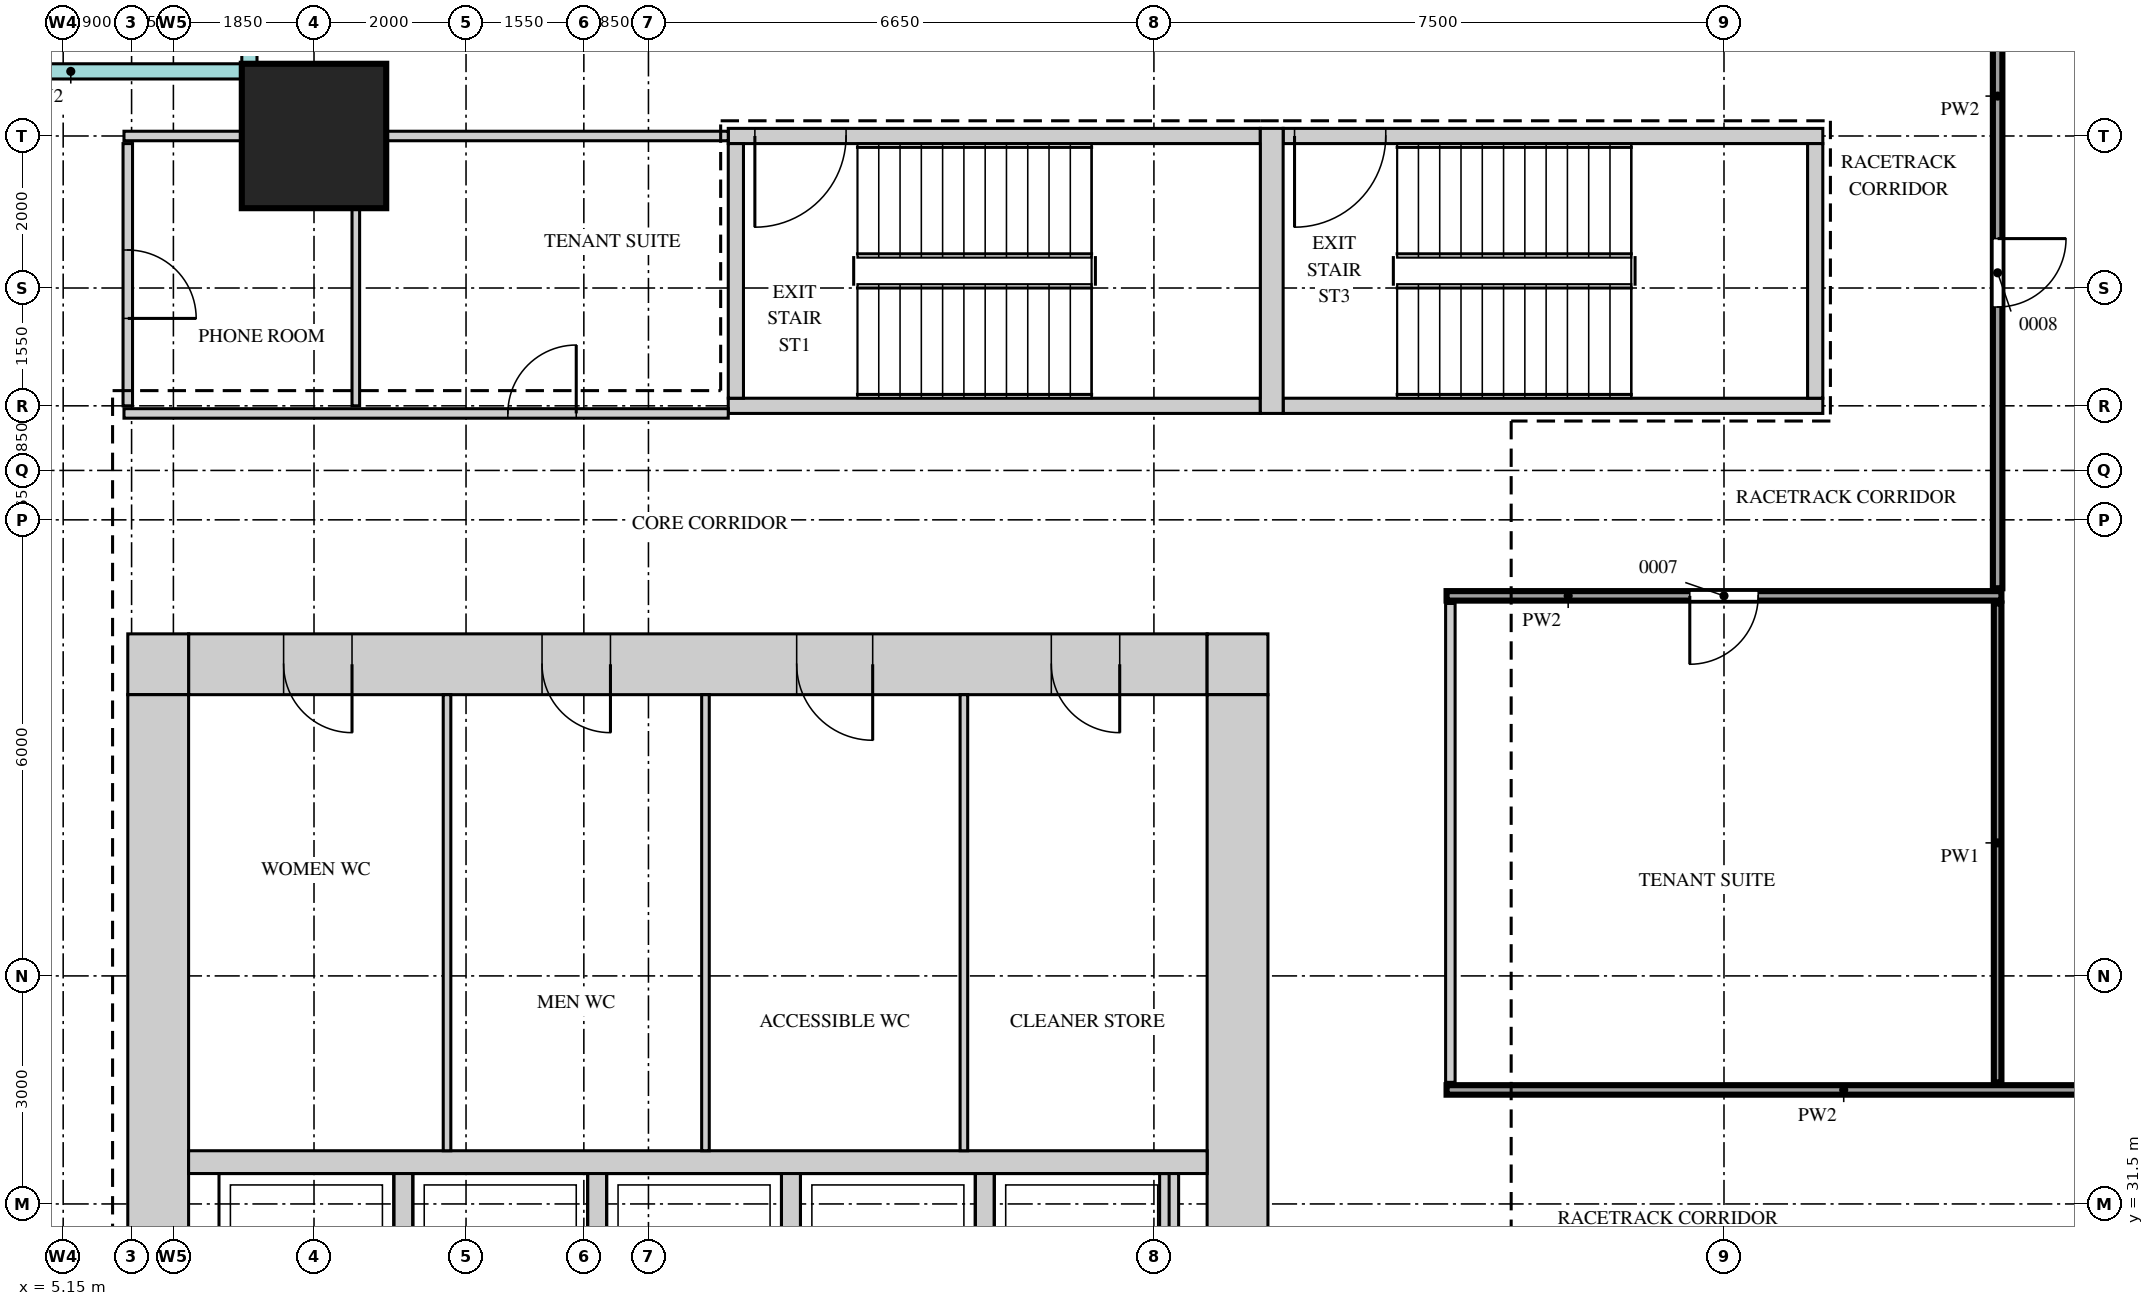
"""IFC4 building model, lengths in metres.
Left out: names, types, materials, properties, quantities, classifications, styles, units other than length and angle.
Written with IfcOpenShell. Run it as: python <this file> out.ifc"""

import sys

from ifc_helpers import new_model, si_unit, direction, frame, frame_2d, origin, origin_2d, place, context, subcontext, project, spatial, rectangle, extrude, source, transform, mapped, element, fill, save


model = new_model("IFC4")
c1 = context("Model", 3, precision=1e-05, world=origin(), true_north=direction((0.0, 1.0)))
c2 = subcontext(c1, "Body", "Model", "MODEL_VIEW")
j1 = project(units=[si_unit("LENGTHUNIT", "METRE"), si_unit("PLANEANGLEUNIT", "RADIAN")], contexts=[c1])
p1 = place(None, origin())
s1 = spatial("IfcSite", under=j1, at=p1, CompositionType="ELEMENT")
p2 = place(p1, origin())
s2 = spatial("IfcBuilding", under=s1, at=p2, CompositionType="ELEMENT")
p3 = place(p2, frame((0.0, 0.0, 184.7)))
s3 = spatial("IfcBuildingStorey", under=s2, at=p3, CompositionType="ELEMENT", Elevation=184.7)
m1 = source(origin(), c2, "Body", "SweptSolid", [
    extrude(rectangle(XDim=13.4, YDim=0.8, at=frame_2d((6.7, 0.0))), origin(), (0.0, 0.0, 1.0), 3.75),
])
p4 = place(p3, frame((6.8, 38.6, 0.0), z_axis=(0.0, 0.0, 1.0), x_axis=(1.0, 0.0, 0.0)))
e1 = element("IfcWall", 1, at=p4, inside=s3, PredefinedType="SHEAR", context=c2, shape_type="MappedRepresentation", body=[
    mapped(m1, transform((0.0, 0.0, 0.0))),
])
m2 = source(origin(), c2, "Body", "SweptSolid", [
    extrude(rectangle(XDim=0.9, YDim=2.1, at=frame_2d((0.45, 1.05))), frame((0.0, 0.41, 0.0), z_axis=(0.0, -1.0, 0.0), x_axis=(1.0, 0.0, 0.0)), (0.0, 0.0, 1.0), 0.82),
])
p5 = place(p4, frame((1.25, 0.0, 0.0)))
e2 = element("IfcOpeningElement", 2, at=p5, cuts=e1, PredefinedType="OPENING", context=c2, shape_type="MappedRepresentation", body=[
    mapped(m2, transform((0.0, 0.0, 0.0))),
])
p6 = place(p4, frame((4.65, 0.0, 0.0)))
e3 = element("IfcOpeningElement", 3, at=p6, cuts=e1, PredefinedType="OPENING", context=c2, shape_type="MappedRepresentation", body=[
    mapped(m2, transform((0.0, 0.0, 0.0))),
])
m3 = source(origin(), c2, "Body", "SweptSolid", [
    extrude(rectangle(XDim=1.0, YDim=2.1, at=frame_2d((0.5, 1.05))), frame((0.0, 0.41, 0.0), z_axis=(0.0, -1.0, 0.0), x_axis=(1.0, 0.0, 0.0)), (0.0, 0.0, 1.0), 0.82),
])
p7 = place(p4, frame((8.0, 0.0, 0.0)))
e4 = element("IfcOpeningElement", 4, at=p7, cuts=e1, PredefinedType="OPENING", context=c2, shape_type="MappedRepresentation", body=[
    mapped(m3, transform((0.0, 0.0, 0.0))),
])
p8 = place(p4, frame((11.35, 0.0, 0.0)))
e5 = element("IfcOpeningElement", 5, at=p8, cuts=e1, PredefinedType="OPENING", context=c2, shape_type="MappedRepresentation", body=[
    mapped(m2, transform((0.0, 0.0, 0.0))),
])
m4 = source(origin(), c2, "Body", "SweptSolid", [
    extrude(rectangle(XDim=0.8, YDim=0.8, at=frame_2d((0.4, 0.0))), origin(), (0.0, 0.0, 1.0), 3.75),
])
for number, where, z_axis, x_axis in (
    (6, (20.2, 38.6, 0.0), (0.0, 0.0, 1.0), (1.0, 0.0, 0.0)),
    (7, (6.0, 38.6, 0.0), (0.0, 0.0, 1.0), (1.0, 0.0, 0.0)),
):
    element("IfcWall", number, at=place(p3, frame(where, z_axis=z_axis, x_axis=x_axis)), inside=s3, PredefinedType="SHEAR", context=c2, shape_type="MappedRepresentation", body=[
        mapped(m4, transform((0.0, 0.0, 0.0))),
    ])
m5 = source(origin(), c2, "Body", "SweptSolid", [
    extrude(rectangle(XDim=22.4, YDim=0.8, at=frame_2d((11.2, 0.0))), origin(), (0.0, 0.0, 1.0), 3.75),
])
p9 = place(p3, frame((20.6, 15.8, 0.0), z_axis=(0.0, 0.0, 1.0), x_axis=(0.0, 1.0, 0.0)))
e8 = element("IfcWall", 8, at=p9, inside=s3, PredefinedType="SHEAR", context=c2, shape_type="MappedRepresentation", body=[
    mapped(m5, transform((0.0, 0.0, 0.0))),
])
m6 = source(origin(), c2, "Body", "SweptSolid", [
    extrude(rectangle(XDim=1.8, YDim=2.1, at=frame_2d((0.9, 1.05))), frame((0.0, 0.41, 0.0), z_axis=(0.0, -1.0, 0.0), x_axis=(1.0, 0.0, 0.0)), (0.0, 0.0, 1.0), 0.82),
])
p10 = place(p9, frame((10.7, 0.0, 0.0)))
e9 = element("IfcOpeningElement", 9, at=p10, cuts=e8, PredefinedType="OPENING", context=c2, shape_type="MappedRepresentation", body=[
    mapped(m6, transform((0.0, 0.0, 0.0))),
])
p11 = place(p9, frame((0.35, 0.0, 0.0)))
e10 = element("IfcOpeningElement", 10, at=p11, cuts=e8, PredefinedType="OPENING", context=c2, shape_type="MappedRepresentation", body=[
    mapped(m2, transform((0.0, 0.0, 0.0))),
])
p12 = place(p9, frame((3.9, 0.0, 0.0)))
e11 = element("IfcOpeningElement", 11, at=p12, cuts=e8, PredefinedType="OPENING", context=c2, shape_type="MappedRepresentation", body=[
    mapped(m2, transform((0.0, 0.0, 0.0))),
])
p13 = place(p3, frame((6.4, 15.8, 0.0), z_axis=(0.0, 0.0, 1.0), x_axis=(0.0, 1.0, 0.0)))
e12 = element("IfcWall", 12, at=p13, inside=s3, PredefinedType="SHEAR", context=c2, shape_type="MappedRepresentation", body=[
    mapped(m5, transform((0.0, 0.0, 0.0))),
])
m7 = source(origin(), c2, "Body", "SweptSolid", [
    extrude(rectangle(XDim=7.0, YDim=0.2, at=frame_2d((3.5, 0.0))), origin(), (0.0, 0.0, 1.0), 3.75),
])
p14 = place(p3, frame((13.9, 45.55, 0.0), z_axis=(0.0, 0.0, 1.0), x_axis=(1.0, 0.0, 0.0)))
e13 = element("IfcWall", 13, at=p14, inside=s3, PredefinedType="SHEAR", context=c2, shape_type="MappedRepresentation", body=[
    mapped(m7, transform((0.0, 0.0, 0.0))),
])
m8 = source(origin(), c2, "Body", "SweptSolid", [
    extrude(rectangle(XDim=1.2, YDim=2.1, at=frame_2d((0.6, 1.05))), frame((0.0, 0.11, 0.0), z_axis=(0.0, -1.0, 0.0), x_axis=(1.0, 0.0, 0.0)), (0.0, 0.0, 1.0), 0.22),
])
p15 = place(p14, frame((0.35, 0.0, 0.0)))
e14 = element("IfcOpeningElement", 14, at=p15, cuts=e13, PredefinedType="OPENING", context=c2, shape_type="MappedRepresentation", body=[
    mapped(m8, transform((0.0, 0.0, 0.0))),
])
p16 = place(p3, frame((13.9, 42.0, 0.0), z_axis=(0.0, 0.0, 1.0), x_axis=(1.0, 0.0, 0.0)))
e15 = element("IfcWall", 15, at=p16, inside=s3, PredefinedType="SHEAR", context=c2, shape_type="MappedRepresentation", body=[
    mapped(m7, transform((0.0, 0.0, 0.0))),
])
m9 = source(origin(), c2, "Body", "SweptSolid", [
    extrude(rectangle(XDim=7.1, YDim=0.2, at=frame_2d((3.55, 0.0))), origin(), (0.0, 0.0, 1.0), 3.75),
])
p17 = place(p3, frame((21.2, 45.55, 0.0), z_axis=(0.0, 0.0, 1.0), x_axis=(1.0, 0.0, 0.0)))
e16 = element("IfcWall", 16, at=p17, inside=s3, PredefinedType="SHEAR", context=c2, shape_type="MappedRepresentation", body=[
    mapped(m9, transform((0.0, 0.0, 0.0))),
])
p18 = place(p17, frame((0.15, 0.0, 0.0)))
e17 = element("IfcOpeningElement", 17, at=p18, cuts=e16, PredefinedType="OPENING", context=c2, shape_type="MappedRepresentation", body=[
    mapped(m8, transform((0.0, 0.0, 0.0))),
])
p19 = place(p3, frame((21.2, 42.0, 0.0), z_axis=(0.0, 0.0, 1.0), x_axis=(1.0, 0.0, 0.0)))
e18 = element("IfcWall", 18, at=p19, inside=s3, PredefinedType="SHEAR", context=c2, shape_type="MappedRepresentation", body=[
    mapped(m9, transform((0.0, 0.0, 0.0))),
])
m10 = source(origin(), c2, "Body", "SweptSolid", [
    extrude(rectangle(XDim=3.75, YDim=0.3, at=frame_2d((1.875, 0.0))), origin(), (0.0, 0.0, 1.0), 3.75),
])
p20 = place(p3, frame((21.05, 41.9, 0.0), z_axis=(0.0, 0.0, 1.0), x_axis=(0.0, 1.0, 0.0)))
e19 = element("IfcWall", 19, at=p20, inside=s3, PredefinedType="SHEAR", context=c2, shape_type="MappedRepresentation", body=[
    mapped(m10, transform((0.0, 0.0, 0.0))),
])
m11 = source(origin(), c2, "Body", "SweptSolid", [
    extrude(rectangle(XDim=3.35, YDim=0.2, at=frame_2d((1.675, 0.0))), origin(), (0.0, 0.0, 1.0), 3.75),
])
for number, where, z_axis, x_axis in (
    (20, (14.0, 42.1, 0.0), (0.0, 0.0, 1.0), (0.0, 1.0, 0.0)),
    (21, (28.2, 42.1, 0.0), (0.0, 0.0, 1.0), (0.0, 1.0, 0.0)),
):
    element("IfcWall", number, at=place(p3, frame(where, z_axis=z_axis, x_axis=x_axis)), inside=s3, PredefinedType="SHEAR", context=c2, shape_type="MappedRepresentation", body=[
        mapped(m11, transform((0.0, 0.0, 0.0))),
    ])
m12 = source(origin(), c2, "Body", "SweptSolid", [
    extrude(rectangle(XDim=13.4, YDim=0.3, at=frame_2d((6.7, 0.0))), origin(), (0.0, 0.0, 1.0), 3.75),
])
p21 = place(p3, frame((6.8, 32.05, 0.0), z_axis=(0.0, 0.0, 1.0), x_axis=(1.0, 0.0, 0.0)))
e22 = element("IfcWall", 22, at=p21, inside=s3, PredefinedType="STANDARD", context=c2, shape_type="MappedRepresentation", body=[
    mapped(m12, transform((0.0, 0.0, 0.0))),
])
m13 = source(origin(), c2, "Body", "SweptSolid", [
    extrude(rectangle(XDim=2.4, YDim=0.25, at=frame_2d((1.2, 0.0))), origin(), (0.0, 0.0, 1.0), 3.75),
])
for number, where, z_axis, x_axis in (
    (23, (17.275, 29.5, 0.0), (0.0, 0.0, 1.0), (0.0, 1.0, 0.0)),
    (24, (19.7, 29.5, 0.0), (0.0, 0.0, 1.0), (0.0, 1.0, 0.0)),
    (25, (9.625, 29.5, 0.0), (0.0, 0.0, 1.0), (0.0, 1.0, 0.0)),
    (26, (12.175, 29.5, 0.0), (0.0, 0.0, 1.0), (0.0, 1.0, 0.0)),
    (27, (14.725, 29.5, 0.0), (0.0, 0.0, 1.0), (0.0, 1.0, 0.0)),
):
    element("IfcWall", number, at=place(p3, frame(where, z_axis=z_axis, x_axis=x_axis)), inside=s3, PredefinedType="STANDARD", context=c2, shape_type="MappedRepresentation", body=[
        mapped(m13, transform((0.0, 0.0, 0.0))),
    ])
m14 = source(origin(), c2, "Body", "SweptSolid", [
    extrude(rectangle(XDim=1.9, YDim=1.9, at=origin_2d()), origin(), (0.0, 0.0, 1.0), 4.0),
])
p22 = place(p3, frame((8.45, 45.55, 0.0), z_axis=(0.0, 0.0, 1.0), x_axis=(1.0, 0.0, 0.0)))
e28 = element("IfcColumn", 28, at=p22, inside=s3, PredefinedType="COLUMN", context=c2, shape_type="MappedRepresentation", body=[
    mapped(m14, transform((0.0, 0.0, 0.0))),
])
m15 = source(origin(), c2, "Body", "SweptSolid", [
    extrude(rectangle(XDim=6.0, YDim=0.1, at=frame_2d((3.0, 0.0))), origin(), (0.0, 0.0, 1.0), 3.8),
])
for number, where, z_axis, x_axis in (
    (29, (10.2, 32.2, 0.0), (0.0, 0.0, 1.0), (0.0, 1.0, 0.0)),
    (30, (13.6, 32.2, 0.0), (0.0, 0.0, 1.0), (0.0, 1.0, 0.0)),
    (31, (17.0, 32.2, 0.0), (0.0, 0.0, 1.0), (0.0, 1.0, 0.0)),
):
    element("IfcWall", number, at=place(p3, frame(where, z_axis=z_axis, x_axis=x_axis)), inside=s3, PredefinedType="PARTITIONING", context=c2, shape_type="MappedRepresentation", body=[
        mapped(m15, transform((0.0, 0.0, 0.0))),
    ])
m16 = source(origin(), c2, "Body", "SweptSolid", [
    extrude(rectangle(XDim=10.45, YDim=0.125, at=frame_2d((5.225, 0.0))), origin(), (0.0, 0.0, 1.0), 3.8),
])
p23 = place(p3, frame((23.35, 33.0, 0.0), z_axis=(0.0, 0.0, 1.0), x_axis=(1.0, 0.0, 0.0)))
e32 = element("IfcWall", 32, at=p23, inside=s3, PredefinedType="PARTITIONING", context=c2, shape_type="MappedRepresentation", body=[
    mapped(m16, transform((0.0, 0.0, 0.0))),
])
m17 = source(origin(), c2, "Body", "SweptSolid", [
    extrude(rectangle(XDim=6.3, YDim=0.125, at=frame_2d((3.15, 0.0))), origin(), (0.0, 0.0, 1.0), 3.8),
])
p24 = place(p3, frame((23.4, 33.1, 0.0), z_axis=(0.0, 0.0, 1.0), x_axis=(0.0, 1.0, 0.0)))
e33 = element("IfcWall", 33, at=p24, inside=s3, PredefinedType="PARTITIONING", context=c2, shape_type="MappedRepresentation", body=[
    mapped(m17, transform((0.0, 0.0, 0.0))),
])
m18 = source(origin(), c2, "Body", "SweptSolid", [
    extrude(rectangle(XDim=6.3, YDim=0.1, at=frame_2d((3.15, 0.0))), origin(), (0.0, 0.0, 1.0), 3.8),
])
p25 = place(p3, frame((30.6, 33.1, 0.0), z_axis=(0.0, 0.0, 1.0), x_axis=(0.0, 1.0, 0.0)))
e34 = element("IfcWall", 34, at=p25, inside=s3, PredefinedType="PARTITIONING", context=c2, shape_type="MappedRepresentation", body=[
    mapped(m18, transform((0.0, 0.0, 0.0))),
])
m19 = source(origin(), c2, "Body", "SweptSolid", [
    extrude(rectangle(XDim=7.3, YDim=0.125, at=frame_2d((3.65, 0.0))), origin(), (0.0, 0.0, 1.0), 3.8),
])
p26 = place(p3, frame((23.35, 39.5, 0.0), z_axis=(0.0, 0.0, 1.0), x_axis=(1.0, 0.0, 0.0)))
e35 = element("IfcWall", 35, at=p26, inside=s3, PredefinedType="PARTITIONING", context=c2, shape_type="MappedRepresentation", body=[
    mapped(m19, transform((0.0, 0.0, 0.0))),
])
m20 = source(origin(), c2, "Body", "SweptSolid", [
    extrude(rectangle(XDim=0.9, YDim=2.1, at=frame_2d((0.45, 1.05))), frame((0.0, 0.073, 0.0), z_axis=(0.0, -1.0, 0.0), x_axis=(1.0, 0.0, 0.0)), (0.0, 0.0, 1.0), 0.145),
])
p27 = place(p26, frame((3.2, 0.0, 0.0)))
e36 = element("IfcOpeningElement", 36, at=p27, cuts=e35, PredefinedType="OPENING", context=c2, shape_type="MappedRepresentation", body=[
    mapped(m20, transform((0.0, 0.0, 0.0))),
])
m21 = source(origin(), c2, "Body", "SweptSolid", [
    extrude(rectangle(XDim=8.35, YDim=0.125, at=frame_2d((4.175, 0.0))), origin(), (0.0, 0.0, 1.0), 3.8),
])
p28 = place(p3, frame((30.6, 39.6, 0.0), z_axis=(0.0, 0.0, 1.0), x_axis=(0.0, 1.0, 0.0)))
e37 = element("IfcWall", 37, at=p28, inside=s3, PredefinedType="PARTITIONING", context=c2, shape_type="MappedRepresentation", body=[
    mapped(m21, transform((0.0, 0.0, 0.0))),
])
p29 = place(p28, frame((3.7, 0.0, 0.0)))
e38 = element("IfcOpeningElement", 38, at=p29, cuts=e37, PredefinedType="OPENING", context=c2, shape_type="MappedRepresentation", body=[
    mapped(m20, transform((0.0, 0.0, 0.0))),
])
m22 = source(origin(), c2, "Body", "SweptSolid", [
    extrude(rectangle(XDim=7.95, YDim=0.125, at=frame_2d((3.975, 0.0))), origin(), (0.0, 0.0, 1.0), 3.8),
])
p30 = place(p3, frame((5.95, 41.9, 0.0), z_axis=(0.0, 0.0, 1.0), x_axis=(1.0, 0.0, 0.0)))
e39 = element("IfcWall", 39, at=p30, inside=s3, PredefinedType="PARTITIONING", context=c2, shape_type="MappedRepresentation", body=[
    mapped(m22, transform((0.0, 0.0, 0.0))),
])
p31 = place(p30, frame((5.05, 0.0, 0.0)))
e40 = element("IfcOpeningElement", 40, at=p31, cuts=e39, PredefinedType="OPENING", context=c2, shape_type="MappedRepresentation", body=[
    mapped(m20, transform((0.0, 0.0, 0.0))),
])
m23 = source(origin(), c2, "Body", "SweptSolid", [
    extrude(rectangle(XDim=3.45, YDim=0.125, at=frame_2d((1.725, 0.0))), origin(), (0.0, 0.0, 1.0), 3.8),
])
p32 = place(p3, frame((6.0, 42.0, 0.0), z_axis=(0.0, 0.0, 1.0), x_axis=(0.0, 1.0, 0.0)))
e41 = element("IfcWall", 41, at=p32, inside=s3, PredefinedType="PARTITIONING", context=c2, shape_type="MappedRepresentation", body=[
    mapped(m23, transform((0.0, 0.0, 0.0))),
])
p33 = place(p32, frame((1.15, 0.0, 0.0)))
e42 = element("IfcOpeningElement", 42, at=p33, cuts=e41, PredefinedType="OPENING", context=c2, shape_type="MappedRepresentation", body=[
    mapped(m20, transform((0.0, 0.0, 0.0))),
])
m24 = source(origin(), c2, "Body", "SweptSolid", [
    extrude(rectangle(XDim=3.45, YDim=0.1, at=frame_2d((1.725, 0.0))), origin(), (0.0, 0.0, 1.0), 3.8),
])
p34 = place(p3, frame((9.0, 42.0, 0.0), z_axis=(0.0, 0.0, 1.0), x_axis=(0.0, 1.0, 0.0)))
e43 = element("IfcWall", 43, at=p34, inside=s3, PredefinedType="PARTITIONING", context=c2, shape_type="MappedRepresentation", body=[
    mapped(m24, transform((0.0, 0.0, 0.0))),
])
m25 = source(origin(), c2, "Body", "SweptSolid", [
    extrude(rectangle(XDim=7.95, YDim=0.125, at=frame_2d((3.975, 0.0))), origin(), (0.0, 0.0, 1.0), 3.25),
])
p35 = place(p3, frame((5.95, 45.55, 0.0), z_axis=(0.0, 0.0, 1.0), x_axis=(1.0, 0.0, 0.0)))
e44 = element("IfcWall", 44, at=p35, inside=s3, PredefinedType="PARTITIONING", context=c2, shape_type="MappedRepresentation", body=[
    mapped(m25, transform((0.0, 0.0, 0.0))),
])
m26 = source(origin(), c2, "Body", "SweptSolid", [
    extrude(rectangle(XDim=0.9, YDim=2.1, at=frame_2d((0.45, 1.05))), frame((0.0, 0.35, 0.0), z_axis=(0.0, -1.0, 0.0), x_axis=(1.0, 0.0, 0.0)), (0.0, 0.0, 1.0), 0.7),
])
p36 = place(p5, origin())
e45 = element("IfcDoor", 45, at=p36, inside=s3, OperationType="SINGLE_SWING_RIGHT", PredefinedType="DOOR", context=c2, shape_type="MappedRepresentation", body=[
    mapped(m26, transform((0.0, 0.0, 0.0))),
])
fill(e2, e45)
p37 = place(p6, origin())
e46 = element("IfcDoor", 46, at=p37, inside=s3, OperationType="SINGLE_SWING_RIGHT", PredefinedType="DOOR", context=c2, shape_type="MappedRepresentation", body=[
    mapped(m26, transform((0.0, 0.0, 0.0))),
])
fill(e3, e46)
m27 = source(origin(), c2, "Body", "SweptSolid", [
    extrude(rectangle(XDim=1.0, YDim=2.1, at=frame_2d((0.5, 1.05))), frame((0.0, 0.35, 0.0), z_axis=(0.0, -1.0, 0.0), x_axis=(1.0, 0.0, 0.0)), (0.0, 0.0, 1.0), 0.7),
])
p38 = place(p7, origin())
e47 = element("IfcDoor", 47, at=p38, inside=s3, OperationType="SINGLE_SWING_RIGHT", PredefinedType="DOOR", context=c2, shape_type="MappedRepresentation", body=[
    mapped(m27, transform((0.0, 0.0, 0.0))),
])
fill(e4, e47)
p39 = place(p8, origin())
e48 = element("IfcDoor", 48, at=p39, inside=s3, OperationType="SINGLE_SWING_RIGHT", PredefinedType="DOOR", context=c2, shape_type="MappedRepresentation", body=[
    mapped(m26, transform((0.0, 0.0, 0.0))),
])
fill(e5, e48)
m28 = source(origin(), c2, "Body", "SweptSolid", [
    extrude(rectangle(XDim=0.9, YDim=2.1, at=frame_2d((0.45, 1.05))), frame((0.0, 0.025, 0.0), z_axis=(0.0, -1.0, 0.0), x_axis=(1.0, 0.0, 0.0)), (0.0, 0.0, 1.0), 0.05),
])
p40 = place(p27, origin())
e49 = element("IfcDoor", 49, at=p40, inside=s3, OperationType="SINGLE_SWING_LEFT", PredefinedType="DOOR", context=c2, shape_type="MappedRepresentation", body=[
    mapped(m28, transform((0.0, 0.0, 0.0))),
])
fill(e36, e49)
p41 = place(p29, origin())
e50 = element("IfcDoor", 50, at=p41, inside=s3, OperationType="SINGLE_SWING_RIGHT", PredefinedType="DOOR", context=c2, shape_type="MappedRepresentation", body=[
    mapped(m28, transform((0.0, 0.0, 0.0))),
])
fill(e38, e50)
p42 = place(p33, origin())
e51 = element("IfcDoor", 51, at=p42, inside=s3, OperationType="SINGLE_SWING_LEFT", PredefinedType="DOOR", context=c2, shape_type="MappedRepresentation", body=[
    mapped(m28, transform((0.0, 0.0, 0.0))),
])
fill(e42, e51)
p43 = place(p31, origin())
e52 = element("IfcDoor", 52, at=p43, inside=s3, OperationType="SINGLE_SWING_LEFT", PredefinedType="DOOR", context=c2, shape_type="MappedRepresentation", body=[
    mapped(m28, transform((0.0, 0.0, 0.0))),
])
fill(e40, e52)
m29 = source(origin(), c2, "Body", "SweptSolid", [
    extrude(rectangle(XDim=1.2, YDim=2.1, at=frame_2d((0.6, 1.05))), frame((0.0, 0.025, 0.0), z_axis=(0.0, -1.0, 0.0), x_axis=(1.0, 0.0, 0.0)), (0.0, 0.0, 1.0), 0.05),
])
p44 = place(p15, origin())
e53 = element("IfcDoor", 53, at=p44, inside=s3, OperationType="SINGLE_SWING_LEFT", PredefinedType="DOOR", context=c2, shape_type="MappedRepresentation", body=[
    mapped(m29, transform((0.0, 0.0, 0.0))),
])
fill(e14, e53)
p45 = place(p18, origin())
e54 = element("IfcDoor", 54, at=p45, inside=s3, OperationType="SINGLE_SWING_LEFT", PredefinedType="DOOR", context=c2, shape_type="MappedRepresentation", body=[
    mapped(m29, transform((0.0, 0.0, 0.0))),
])
fill(e17, e54)
save(model, sys.argv[1])
